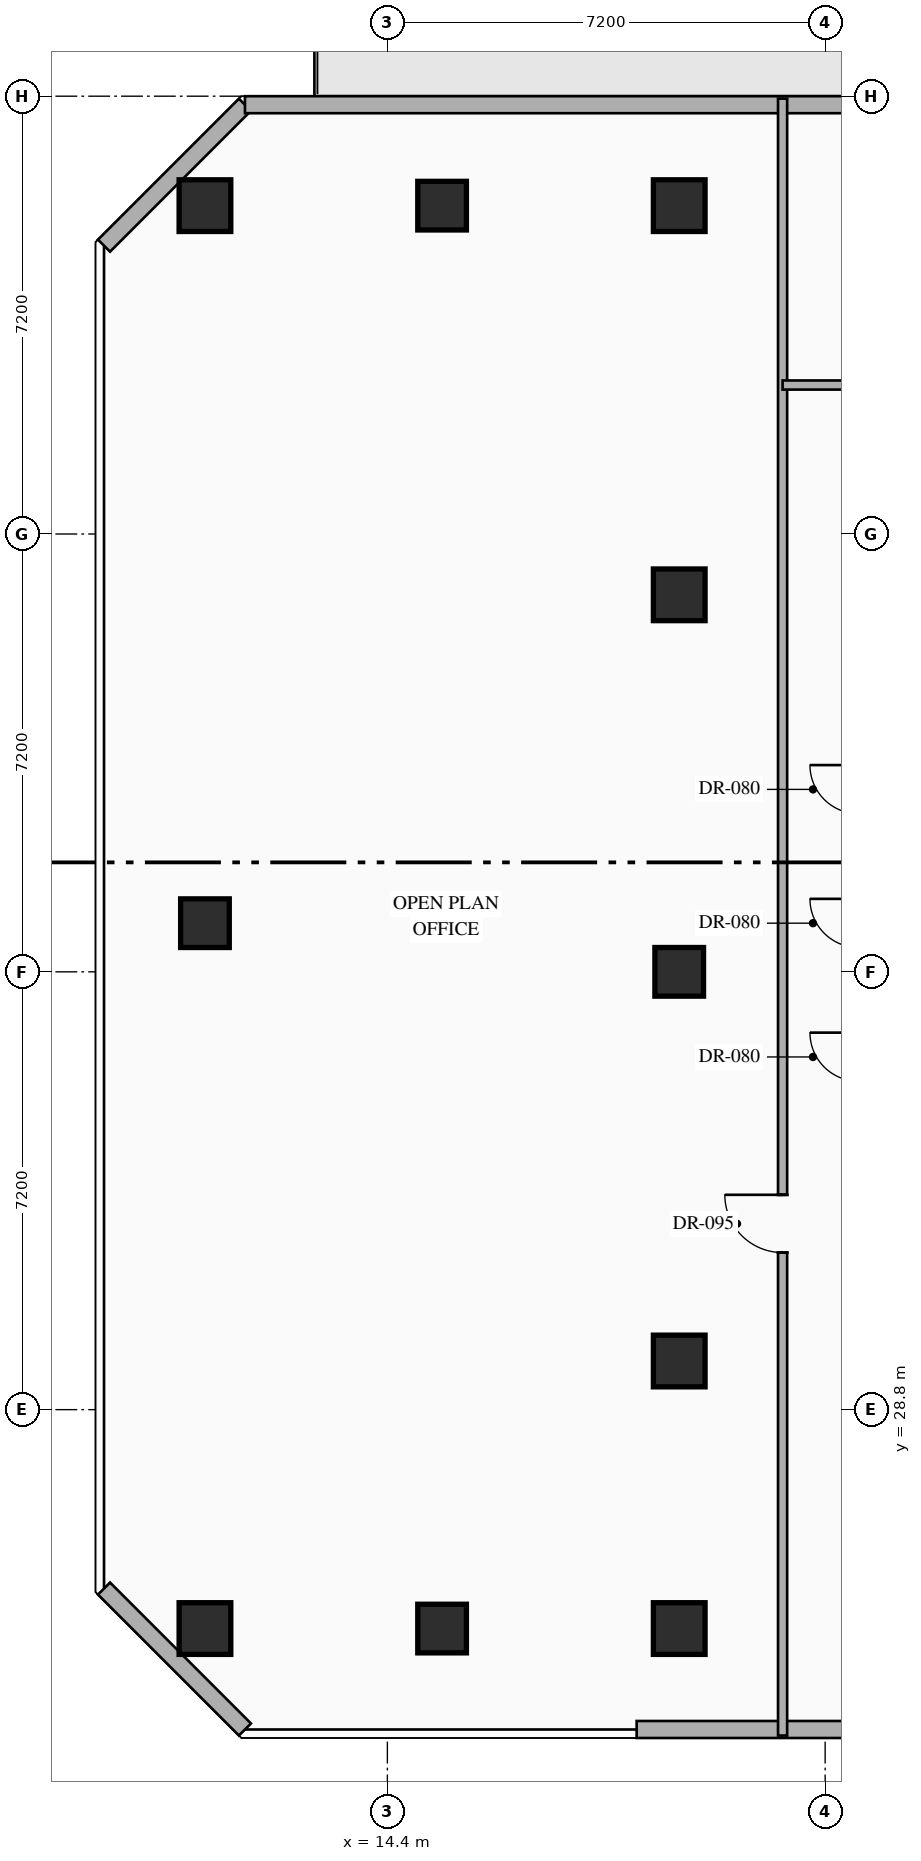
"""IFC4 building model, lengths in metres.
Left out: names, types, materials, properties, quantities, classifications, styles, units other than length and angle.
Written with IfcOpenShell. Run it as: python <this file> out.ifc"""

import sys

from ifc_helpers import new_model, si_unit, direction, frame, frame_2d, origin, origin_2d, place, context, subcontext, project, spatial, rectangle, hollow_rectangle, extrude, element, fill, save


model = new_model("IFC4")
c1 = context("Model", 3, precision=1e-05, world=origin(), true_north=direction((0.0, 1.0)))
c2 = subcontext(c1, "Body", "Model", "MODEL_VIEW")
j1 = project(units=[si_unit("LENGTHUNIT", "METRE"), si_unit("PLANEANGLEUNIT", "RADIAN")], contexts=[c1])
p1 = place(None, origin())
s1 = spatial("IfcSite", under=j1, at=p1, CompositionType="ELEMENT")
p2 = place(p1, origin())
s2 = spatial("IfcBuilding", under=s1, at=p2, CompositionType="ELEMENT")
p3 = place(p2, frame((0.0, 0.0, 152.85)))
s3 = spatial("IfcBuildingStorey", under=s2, at=p3, CompositionType="ELEMENT", Elevation=152.85)
for number, where, z_axis, x_axis in (
    (1, (11.4, 25.2, 0.0), (0.0, 0.0, 1.0), (1.0, 0.0, 0.0)),
    (2, (11.4, 48.6, 0.0), (0.0, 0.0, 1.0), (1.0, 0.0, 0.0)),
    (3, (19.2, 48.6, 0.0), (0.0, 0.0, 1.0), (1.0, 0.0, 0.0)),
    (4, (19.2, 25.2, 0.0), (0.0, 0.0, 1.0), (1.0, 0.0, 0.0)),
    (5, (19.2, 29.6, 0.0), (0.0, 0.0, 1.0), (1.0, 0.0, 0.0)),
    (6, (19.2, 42.2, 0.0), (0.0, 0.0, 1.0), (1.0, 0.0, 0.0)),
):
    element("IfcColumn", number, at=place(p3, frame(where, z_axis=z_axis, x_axis=x_axis)), inside=s3, PredefinedType="COLUMN", context=c2, shape_type="SweptSolid", body=[
        extrude(hollow_rectangle(XDim=0.85, YDim=0.85, WallThickness=0.032, at=origin_2d()), origin(), (0.0, 0.0, 1.0), 3.6),
    ])
for number, where, z_axis, x_axis in (
    (7, (11.4, 36.8, 0.0), (0.0, 0.0, 1.0), (1.0, 0.0, 0.0)),
    (8, (19.2, 36.0, 0.0), (0.0, 0.0, 1.0), (1.0, 0.0, 0.0)),
    (9, (15.3, 25.2, 0.0), (0.0, 0.0, 1.0), (1.0, 0.0, 0.0)),
    (10, (15.3, 48.6, 0.0), (0.0, 0.0, 1.0), (1.0, 0.0, 0.0)),
):
    element("IfcColumn", number, at=place(p3, frame(where, z_axis=z_axis, x_axis=x_axis)), inside=s3, PredefinedType="COLUMN", context=c2, shape_type="SweptSolid", body=[
        extrude(hollow_rectangle(XDim=0.8, YDim=0.8, WallThickness=0.032, at=origin_2d()), origin(), (0.0, 0.0, 1.0), 3.6),
    ])
p4 = place(p3, frame((25.247, 23.54, 0.0), z_axis=(0.0, 0.0, 1.0), x_axis=(-1.0, 0.0, 0.0)))
e11 = element("IfcWall", 11, at=p4, inside=s3, PredefinedType="STANDARD", context=c2, shape_type="SweptSolid", body=[
    extrude(rectangle(XDim=6.747, YDim=0.28, at=frame_2d((3.374, 0.0))), origin(), (0.0, 0.0, 1.0), 3.35),
])
p5 = place(p3, frame((12.058, 23.54, 0.0), z_axis=(0.0, 0.0, 1.0), x_axis=(-0.707144017911, 0.707069542501, 0.0)))
e12 = element("IfcWall", 12, at=p5, inside=s3, PredefinedType="STANDARD", context=c2, shape_type="SweptSolid", body=[
    extrude(rectangle(XDim=3.278, YDim=0.28, at=frame_2d((1.639, 0.0))), origin(), (0.0, 0.0, 1.0), 3.35),
])
p6 = place(p3, frame((9.74, 47.942, 0.0), z_axis=(0.0, 0.0, 1.0), x_axis=(0.707106781187, 0.707106781187, 0.0)))
e13 = element("IfcWall", 13, at=p6, inside=s3, PredefinedType="STANDARD", context=c2, shape_type="SweptSolid", body=[
    extrude(rectangle(XDim=3.278, YDim=0.28, at=frame_2d((1.639, 0.0))), origin(), (0.0, 0.0, 1.0), 3.35),
])
p7 = place(p3, frame((12.058, 50.26, 0.0), z_axis=(0.0, 0.0, 1.0), x_axis=(1.0, 0.0, 0.0)))
e14 = element("IfcWall", 14, at=p7, inside=s3, PredefinedType="STANDARD", context=c2, shape_type="SweptSolid", body=[
    extrude(rectangle(XDim=30.484, YDim=0.28, at=frame_2d((15.242, 0.0))), origin(), (0.0, 0.0, 1.0), 3.35),
])
p8 = place(p7, frame((14.992, 0.0, 0.0)))
e15 = element("IfcOpeningElement", 15, at=p8, cuts=e14, PredefinedType="OPENING", context=c2, shape_type="SweptSolid", body=[
    extrude(rectangle(XDim=1.1, YDim=2.2, at=frame_2d((0.55, 1.1))), frame((0.0, 0.15, 0.0), z_axis=(0.0, -1.0, 0.0), x_axis=(1.0, 0.0, 0.0)), (0.0, 0.0, 1.0), 0.3),
])
p9 = place(p7, frame((10.074, 0.0, 0.85)))
e16 = element("IfcOpeningElement", 16, at=p9, cuts=e14, PredefinedType="OPENING", context=c2, shape_type="SweptSolid", body=[
    extrude(rectangle(XDim=1.8, YDim=2.1, at=frame_2d((0.9, 1.05))), frame((0.0, 0.15, 0.0), z_axis=(0.0, -1.0, 0.0), x_axis=(1.0, 0.0, 0.0)), (0.0, 0.0, 1.0), 0.3),
])
p10 = place(p3, frame((20.9, 23.44, 0.0), z_axis=(0.0, 0.0, 1.0), x_axis=(0.0, 1.0, 0.0)))
e17 = element("IfcWall", 17, at=p10, inside=s3, PredefinedType="PARTITIONING", context=c2, shape_type="SweptSolid", body=[
    extrude(rectangle(XDim=26.92, YDim=0.15, at=frame_2d((13.46, 0.0))), origin(), (0.0, 0.0, 1.0), 3.35),
])
p11 = place(p10, frame((7.943, 0.0, 0.0)))
e18 = element("IfcOpeningElement", 18, at=p11, cuts=e17, PredefinedType="OPENING", context=c2, shape_type="SweptSolid", body=[
    extrude(rectangle(XDim=0.95, YDim=2.15, at=frame_2d((0.475, 1.075))), frame((0.0, 0.085, 0.0), z_axis=(0.0, -1.0, 0.0), x_axis=(1.0, 0.0, 0.0)), (0.0, 0.0, 1.0), 0.17),
])
p12 = place(p3, frame((20.9, 45.65, 0.0), z_axis=(0.0, 0.0, 1.0), x_axis=(1.0, 0.0, 0.0)))
e19 = element("IfcWall", 19, at=p12, inside=s3, PredefinedType="PARTITIONING", context=c2, shape_type="SweptSolid", body=[
    extrude(rectangle(XDim=24.06, YDim=0.15, at=frame_2d((12.03, 0.0))), origin(), (0.0, 0.0, 1.0), 2.695),
])
p13 = place(p12, frame((9.32, 0.0, 0.0)))
e20 = element("IfcOpeningElement", 20, at=p13, cuts=e19, PredefinedType="OPENING", context=c2, shape_type="SweptSolid", body=[
    extrude(rectangle(XDim=0.95, YDim=2.15, at=frame_2d((0.475, 1.075))), frame((0.0, 0.085, 0.0), z_axis=(0.0, -1.0, 0.0), x_axis=(1.0, 0.0, 0.0)), (0.0, 0.0, 1.0), 0.17),
])
p14 = place(p11, origin())
e21 = element("IfcDoor", 21, at=p14, inside=s3, OperationType="SINGLE_SWING_RIGHT", PredefinedType="DOOR", context=c2, shape_type="SweptSolid", body=[
    extrude(rectangle(XDim=0.95, YDim=2.15, at=frame_2d((0.475, 1.075))), frame((0.0, 0.025, 0.0), z_axis=(0.0, -1.0, 0.0), x_axis=(1.0, 0.0, 0.0)), (0.0, 0.0, 1.0), 0.05),
])
fill(e18, e21)
save(model, sys.argv[1])
